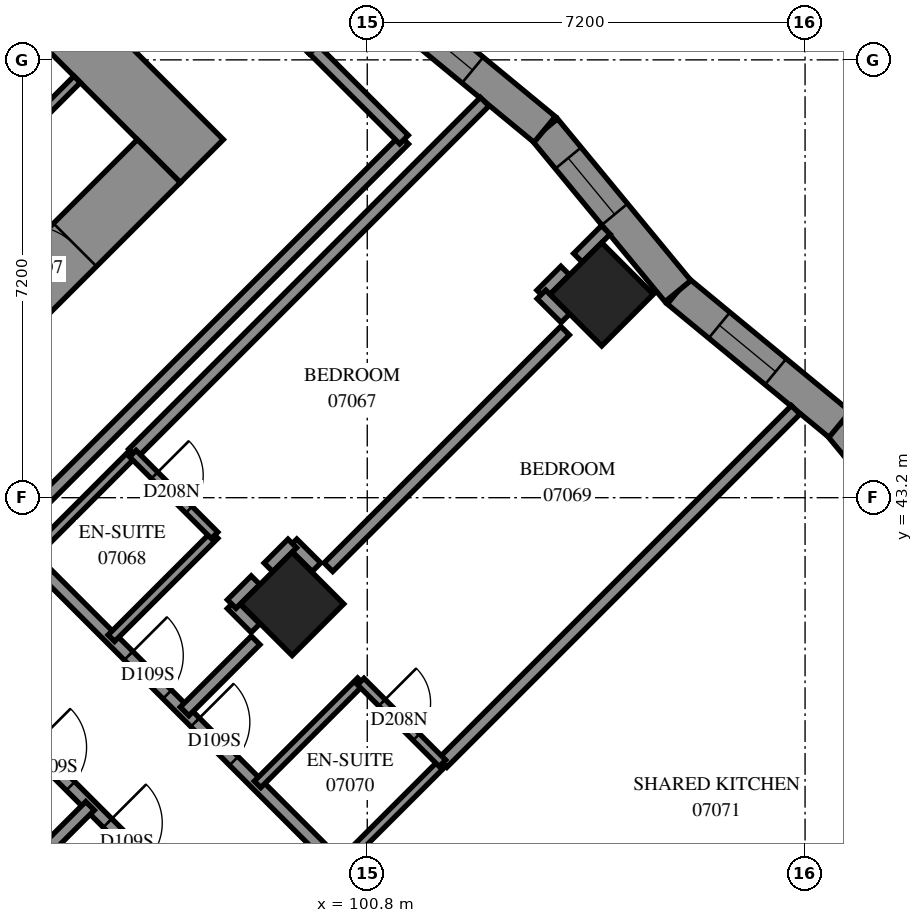
"""IFC4 building model, lengths in metres.
Left out: names, types, materials, properties, quantities, classifications, styles, units other than length and angle.
Written with IfcOpenShell. Run it as: python <this file> out.ifc"""

import sys

from ifc_helpers import new_model, si_unit, direction, frame, frame_2d, origin, origin_2d, place, context, subcontext, project, spatial, polyline, rectangle, outline, extrude, element, fill, save


model = new_model("IFC4")
c1 = context("Model", 3, precision=1e-05, world=origin(), true_north=direction((0.0, 1.0)))
c2 = subcontext(c1, "Body", "Model", "MODEL_VIEW")
j1 = project(units=[si_unit("LENGTHUNIT", "METRE"), si_unit("PLANEANGLEUNIT", "RADIAN")], contexts=[c1])
p1 = place(None, origin())
s1 = spatial("IfcSite", under=j1, at=p1, CompositionType="ELEMENT")
p2 = place(p1, origin())
s2 = spatial("IfcBuilding", under=s1, at=p2, CompositionType="ELEMENT")
p3 = place(p2, frame((0.0, 0.0, 30.4)))
s3 = spatial("IfcBuildingStorey", under=s2, at=p3, CompositionType="ELEMENT", Elevation=30.4)
for number, where, z_axis, x_axis in (
    (1, (104.656, 46.544, 0.0), (0.0, 0.0, 1.0), (0.707, -0.707, 0.0)),
    (2, (99.565, 41.453, 0.0), (0.0, 0.0, 1.0), (0.707, -0.707, 0.0)),
):
    element("IfcColumn", number, at=place(p3, frame(where, z_axis=z_axis, x_axis=x_axis)), inside=s3, PredefinedType="COLUMN", context=c2, shape_type="SweptSolid", body=[
        extrude(rectangle(XDim=1.2, YDim=1.2, at=origin_2d()), origin(), (0.0, 0.0, 1.0), 3.1),
    ])
p4 = place(p3, frame((86.483, 60.333, -0.3), z_axis=(0.0, 0.0, 1.0), x_axis=(0.70710983, -0.7071037324, 0.0)))
e3 = element("IfcWall", 3, at=p4, inside=s3, PredefinedType="SHEAR", context=c2, shape_type="SweptSolid", body=[
    extrude(rectangle(XDim=16.4, YDim=1.0, at=frame_2d((8.2, 0.0))), origin(), (0.0, 0.0, 1.0), 2.7),
])
p5 = place(p4, frame((11.0, 0.0, 0.3)))
e4 = element("IfcOpeningElement", 4, at=p5, cuts=e3, PredefinedType="OPENING", context=c2, shape_type="SweptSolid", body=[
    extrude(rectangle(XDim=0.8, YDim=2.1, at=frame_2d((0.4, 1.05))), frame((0.0, 0.51, 0.0), z_axis=(0.0, -1.0, 0.0), x_axis=(1.0, 0.0, 0.0)), (0.0, 0.0, 1.0), 1.02),
])
p6 = place(p3, frame((87.19, 38.554, -0.3), z_axis=(0.0, 0.0, 1.0), x_axis=(0.707103309, 0.7071102534, 0.0)))
e5 = element("IfcWall", 5, at=p6, inside=s3, PredefinedType="SHEAR", context=c2, shape_type="SweptSolid", body=[
    extrude(rectangle(XDim=14.4, YDim=1.0, at=frame_2d((7.2, 0.0))), origin(), (0.0, 0.0, 1.0), 2.7),
])
p7 = place(p6, frame((4.55, 0.0, 0.3)))
e6 = element("IfcOpeningElement", 6, at=p7, cuts=e5, PredefinedType="OPENING", context=c2, shape_type="SweptSolid", body=[
    extrude(rectangle(XDim=1.1, YDim=2.1, at=frame_2d((0.55, 1.05))), frame((0.0, 0.51, 0.0), z_axis=(0.0, -1.0, 0.0), x_axis=(1.0, 0.0, 0.0)), (0.0, 0.0, 1.0), 1.02),
])
p8 = place(p6, frame((11.35, 0.0, 0.3)))
e7 = element("IfcOpeningElement", 7, at=p8, cuts=e5, PredefinedType="OPENING", context=c2, shape_type="SweptSolid", body=[
    extrude(rectangle(XDim=1.1, YDim=2.1, at=frame_2d((0.55, 1.05))), frame((0.0, 0.51, 0.0), z_axis=(0.0, -1.0, 0.0), x_axis=(1.0, 0.0, 0.0)), (0.0, 0.0, 1.0), 1.02),
])
p9 = place(p3, frame((110.76, 41.746, 0.0), z_axis=(0.0, 0.0, 1.0), x_axis=(-0.636139456, 0.7715741005, 0.0)))
e8 = element("IfcWall", 8, at=p9, inside=s3, PredefinedType="SOLIDWALL", context=c2, shape_type="SweptSolid", body=[
    extrude(outline(polyline([(0.026, -0.275), (3.472, -0.275), (3.42, 0.275), (-0.026, 0.275), (0.026, -0.275)])), origin(), (0.0, 0.0, 1.0), 3.1),
])
p10 = place(p9, frame((1.266, 0.0, 0.5)))
e9 = element("IfcOpeningElement", 9, at=p10, cuts=e8, PredefinedType="OPENING", context=c2, shape_type="SweptSolid", body=[
    extrude(rectangle(XDim=1.2, YDim=2.45, at=frame_2d((0.6, 1.225))), frame((0.0, 0.285, 0.0), z_axis=(0.0, -1.0, 0.0), x_axis=(1.0, 0.0, 0.0)), (0.0, 0.0, 1.0), 0.57),
])
p11 = place(p3, frame((108.568, 44.405, 0.0), z_axis=(0.0, 0.0, 1.0), x_axis=(-0.7715741005, 0.636139456, 0.0)))
e10 = element("IfcWall", 10, at=p11, inside=s3, PredefinedType="SOLIDWALL", context=c2, shape_type="SweptSolid", body=[
    extrude(outline(polyline([(-0.026, -0.275), (3.42, -0.275), (3.472, 0.275), (0.026, 0.275), (-0.026, -0.275)])), origin(), (0.0, 0.0, 1.0), 3.1),
])
p12 = place(p11, frame((1.364, 0.0, 0.5)))
e11 = element("IfcOpeningElement", 11, at=p12, cuts=e10, PredefinedType="OPENING", context=c2, shape_type="SweptSolid", body=[
    extrude(rectangle(XDim=1.2, YDim=2.45, at=frame_2d((0.6, 1.225))), frame((0.0, 0.285, 0.0), z_axis=(0.0, -1.0, 0.0), x_axis=(1.0, 0.0, 0.0)), (0.0, 0.0, 1.0), 0.57),
])
p13 = place(p3, frame((105.91, 46.597, 0.0), z_axis=(0.0, 0.0, 1.0), x_axis=(-0.6361567317, 0.7715598569, 0.0)))
e12 = element("IfcWall", 12, at=p13, inside=s3, PredefinedType="SOLIDWALL", context=c2, shape_type="SweptSolid", body=[
    extrude(outline(polyline([(0.026, -0.275), (3.472, -0.275), (3.42, 0.275), (-0.026, 0.275), (0.026, -0.275)])), origin(), (0.0, 0.0, 1.0), 3.1),
])
p14 = place(p13, frame((1.636, 0.0, 0.5)))
e13 = element("IfcOpeningElement", 13, at=p14, cuts=e12, PredefinedType="OPENING", context=c2, shape_type="SweptSolid", body=[
    extrude(rectangle(XDim=1.2, YDim=2.45, at=frame_2d((0.6, 1.225))), frame((0.0, 0.285, 0.0), z_axis=(0.0, -1.0, 0.0), x_axis=(1.0, 0.0, 0.0)), (0.0, 0.0, 1.0), 0.57),
])
p15 = place(p3, frame((103.717, 49.256, 0.0), z_axis=(0.0, 0.0, 1.0), x_axis=(-0.7715598569, 0.6361567317, 0.0)))
e14 = element("IfcWall", 14, at=p15, inside=s3, PredefinedType="SOLIDWALL", context=c2, shape_type="SweptSolid", body=[
    extrude(outline(polyline([(-0.026, -0.275), (3.42, -0.275), (3.472, 0.275), (0.026, 0.275), (-0.026, -0.275)])), origin(), (0.0, 0.0, 1.0), 3.1),
])
p16 = place(p15, frame((1.535, 0.0, 0.5)))
e15 = element("IfcOpeningElement", 15, at=p16, cuts=e14, PredefinedType="OPENING", context=c2, shape_type="SweptSolid", body=[
    extrude(rectangle(XDim=1.2, YDim=2.45, at=frame_2d((0.6, 1.225))), frame((0.0, 0.285, 0.0), z_axis=(0.0, -1.0, 0.0), x_axis=(1.0, 0.0, 0.0)), (0.0, 0.0, 1.0), 0.57),
])
p17 = place(p3, frame((95.308, 49.358, 0.0), z_axis=(0.0, 0.0, 1.0), x_axis=(0.70705776, 0.707155799, 0.0)))
e16 = element("IfcWall", 16, at=p17, inside=s3, PredefinedType="PARTITIONING", context=c2, shape_type="SweptSolid", body=[
    extrude(rectangle(XDim=1.02, YDim=0.15, at=frame_2d((0.51, 0.0))), origin(), (0.0, 0.0, 1.0), 3.1),
])
p18 = place(p3, frame((94.895, 42.581, 0.0), z_axis=(0.0, 0.0, 1.0), x_axis=(0.7071067812, -0.7071067812, 0.0)))
e17 = element("IfcWall", 17, at=p18, inside=s3, PredefinedType="PARTITIONING", context=c2, shape_type="SweptSolid", body=[
    extrude(rectangle(XDim=14.9, YDim=0.2, at=frame_2d((7.45, 0.0))), origin(), (0.0, 0.0, 1.0), 3.1),
])
p19 = place(p18, frame((2.8, 0.0, 0.0)))
e18 = element("IfcOpeningElement", 18, at=p19, cuts=e17, PredefinedType="OPENING", context=c2, shape_type="SweptSolid", body=[
    extrude(rectangle(XDim=0.9, YDim=2.1, at=frame_2d((0.45, 1.05))), frame((0.0, 0.11, 0.0), z_axis=(0.0, -1.0, 0.0), x_axis=(1.0, 0.0, 0.0)), (0.0, 0.0, 1.0), 0.22),
])
p20 = place(p18, frame((4.348, 0.0, 0.0)))
e19 = element("IfcOpeningElement", 19, at=p20, cuts=e17, PredefinedType="OPENING", context=c2, shape_type="SweptSolid", body=[
    extrude(rectangle(XDim=0.9, YDim=2.1, at=frame_2d((0.45, 1.05))), frame((0.0, 0.11, 0.0), z_axis=(0.0, -1.0, 0.0), x_axis=(1.0, 0.0, 0.0)), (0.0, 0.0, 1.0), 0.22),
])
p21 = place(p18, frame((10.073, 0.0, 0.0)))
e20 = element("IfcOpeningElement", 20, at=p21, cuts=e17, PredefinedType="OPENING", context=c2, shape_type="SweptSolid", body=[
    extrude(rectangle(XDim=1.0, YDim=2.1, at=frame_2d((0.5, 1.05))), frame((0.0, 0.11, 0.0), z_axis=(0.0, -1.0, 0.0), x_axis=(1.0, 0.0, 0.0)), (0.0, 0.0, 1.0), 0.22),
])
p22 = place(p3, frame((105.437, 32.045, 0.0), z_axis=(0.0, 0.0, 1.0), x_axis=(0.7070175341, 0.707196017, 0.0)))
e21 = element("IfcWall", 21, at=p22, inside=s3, PredefinedType="PARTITIONING", context=c2, shape_type="SweptSolid", body=[
    extrude(rectangle(XDim=10.645, YDim=0.2, at=frame_2d((5.323, 0.0))), origin(), (0.0, 0.0, 1.0), 3.1),
])
p23 = place(p3, frame((94.901, 42.583, 0.0), z_axis=(0.0, 0.0, 1.0), x_axis=(0.7072154749, 0.7069980708, 0.0)))
e22 = element("IfcWall", 22, at=p23, inside=s3, PredefinedType="PARTITIONING", context=c2, shape_type="SweptSolid", body=[
    extrude(rectangle(XDim=9.2, YDim=0.2, at=frame_2d((4.6, 0.0))), origin(), (0.0, 0.0, 1.0), 3.1),
])
p24 = place(p3, frame((102.039, 38.837, 0.0), z_axis=(0.0, 0.0, 1.0), x_axis=(0.7071067812, 0.7071067812, 0.0)))
e23 = element("IfcWall", 23, at=p24, inside=s3, PredefinedType="PARTITIONING", context=c2, shape_type="SweptSolid", body=[
    extrude(rectangle(XDim=8.212, YDim=0.2, at=frame_2d((4.106, 0.0))), origin(), (0.0, 0.0, 1.0), 3.1),
])
p25 = place(p3, frame((96.947, 43.929, 0.0), z_axis=(0.0, 0.0, 1.0), x_axis=(0.707112894, 0.7071006683, 0.0)))
e24 = element("IfcWall", 24, at=p25, inside=s3, PredefinedType="PARTITIONING", context=c2, shape_type="SweptSolid", body=[
    extrude(rectangle(XDim=8.18, YDim=0.2, at=frame_2d((4.09, 0.0))), origin(), (0.0, 0.0, 1.0), 3.1),
])
p26 = place(p3, frame((100.161, 42.057, 0.0), z_axis=(0.0, 0.0, 1.0), x_axis=(0.7072884866, 0.706925029, 0.0)))
e25 = element("IfcWall", 25, at=p26, inside=s3, PredefinedType="PARTITIONING", context=c2, shape_type="SweptSolid", body=[
    extrude(rectangle(XDim=5.503, YDim=0.2, at=frame_2d((2.751, 0.0))), origin(), (0.0, 0.0, 1.0), 3.1),
])
p27 = place(p3, frame((93.699, 40.679, 0.0), z_axis=(0.0, 0.0, 1.0), x_axis=(0.7071067812, -0.7071067812, 0.0)))
e26 = element("IfcWall", 26, at=p27, inside=s3, PredefinedType="PARTITIONING", context=c2, shape_type="SweptSolid", body=[
    extrude(rectangle(XDim=5.301, YDim=0.2, at=frame_2d((2.65, 0.0))), origin(), (0.0, 0.0, 1.0), 3.1),
])
p28 = place(p27, frame((2.242, 0.0, 0.0)))
e27 = element("IfcOpeningElement", 27, at=p28, cuts=e26, PredefinedType="OPENING", context=c2, shape_type="SweptSolid", body=[
    extrude(rectangle(XDim=0.9, YDim=2.1, at=frame_2d((0.45, 1.05))), frame((0.0, 0.11, 0.0), z_axis=(0.0, -1.0, 0.0), x_axis=(1.0, 0.0, 0.0)), (0.0, 0.0, 1.0), 0.22),
])
p29 = place(p27, frame((4.002, 0.0, 0.0)))
e28 = element("IfcOpeningElement", 28, at=p29, cuts=e26, PredefinedType="OPENING", context=c2, shape_type="SweptSolid", body=[
    extrude(rectangle(XDim=0.9, YDim=2.1, at=frame_2d((0.45, 1.05))), frame((0.0, 0.11, 0.0), z_axis=(0.0, -1.0, 0.0), x_axis=(1.0, 0.0, 0.0)), (0.0, 0.0, 1.0), 0.22),
])
for number, where, z_axis, x_axis in (
    (29, (100.34, 37.142, 0.0), (0.0, 0.0, 1.0), (0.708, 0.707, 0.0)),
    (30, (96.592, 40.89, 0.0), (0.0, 0.0, 1.0), (0.708, 0.707, 0.0)),
    (31, (98.996, 38.486, 0.0), (0.0, 0.0, 1.0), (0.708, 0.707, 0.0)),
    (32, (95.252, 42.23, 0.0), (0.0, 0.0, 1.0), (0.707, 0.708, 0.0)),
):
    element("IfcWall", number, at=place(p3, frame(where, z_axis=z_axis, x_axis=x_axis)), inside=s3, PredefinedType="PARTITIONING", context=c2, shape_type="SweptSolid", body=[
        extrude(rectangle(XDim=2.4, YDim=0.15, at=frame_2d((1.2, 0.0))), origin(), (0.0, 0.0, 1.0), 3.1),
    ])
p30 = place(p3, frame((99.918, 50.574, 0.0), z_axis=(0.0, 0.0, 1.0), x_axis=(0.7075827869, -0.7066304548, 0.0)))
e33 = element("IfcWall", 33, at=p30, inside=s3, PredefinedType="PARTITIONING", context=c2, shape_type="SweptSolid", body=[
    extrude(rectangle(XDim=2.1, YDim=0.2, at=frame_2d((1.05, 0.0))), origin(), (0.0, 0.0, 1.0), 3.1),
])
p31 = place(p3, frame((96.945, 43.925, 0.0), z_axis=(0.0, 0.0, 1.0), x_axis=(0.7071067812, -0.7071067812, 0.0)))
e34 = element("IfcWall", 34, at=p31, inside=s3, PredefinedType="PARTITIONING", context=c2, shape_type="SweptSolid", body=[
    extrude(rectangle(XDim=1.901, YDim=0.15, at=frame_2d((0.95, 0.0))), origin(), (0.0, 0.0, 1.0), 3.1),
])
p32 = place(p31, frame((0.505, 0.0, 0.0)))
e35 = element("IfcOpeningElement", 35, at=p32, cuts=e34, PredefinedType="OPENING", context=c2, shape_type="SweptSolid", body=[
    extrude(rectangle(XDim=0.8, YDim=2.1, at=frame_2d((0.4, 1.05))), frame((0.0, 0.085, 0.0), z_axis=(0.0, -1.0, 0.0), x_axis=(1.0, 0.0, 0.0)), (0.0, 0.0, 1.0), 0.17),
])
p33 = place(p3, frame((100.693, 40.177, 0.0), z_axis=(0.0, 0.0, 1.0), x_axis=(0.7071067812, -0.7071067812, 0.0)))
e36 = element("IfcWall", 36, at=p33, inside=s3, PredefinedType="PARTITIONING", context=c2, shape_type="SweptSolid", body=[
    extrude(rectangle(XDim=1.901, YDim=0.15, at=frame_2d((0.95, 0.0))), origin(), (0.0, 0.0, 1.0), 3.1),
])
p34 = place(p33, frame((0.493, 0.0, 0.0)))
e37 = element("IfcOpeningElement", 37, at=p34, cuts=e36, PredefinedType="OPENING", context=c2, shape_type="SweptSolid", body=[
    extrude(rectangle(XDim=0.8, YDim=2.1, at=frame_2d((0.4, 1.05))), frame((0.0, 0.085, 0.0), z_axis=(0.0, -1.0, 0.0), x_axis=(1.0, 0.0, 0.0)), (0.0, 0.0, 1.0), 0.17),
])
for number, where, z_axis, x_axis in (
    (38, (97.796, 39.686, 0.0), (0.0, 0.0, 1.0), (0.707, 0.707, 0.0)),
    (39, (95.073, 36.963, 0.0), (0.0, 0.0, 1.0), (0.707, 0.707, 0.0)),
):
    element("IfcWall", number, at=place(p3, frame(where, z_axis=z_axis, x_axis=x_axis)), inside=s3, PredefinedType="PARTITIONING", context=c2, shape_type="SweptSolid", body=[
        extrude(rectangle(XDim=1.652, YDim=0.2, at=frame_2d((0.826, 0.0))), origin(), (0.0, 0.0, 1.0), 3.1),
    ])
p35 = place(p3, frame((99.453, 51.033, 0.0), z_axis=(0.0, 0.0, 1.0), x_axis=(0.7071067812, -0.7071067812, 0.0)))
e40 = element("IfcWall", 40, at=p35, inside=s3, PredefinedType="PARTITIONING", context=c2, shape_type="SweptSolid", body=[
    extrude(rectangle(XDim=0.653, YDim=0.2, at=frame_2d((0.327, 0.0))), origin(), (0.0, 0.0, 1.0), 3.1),
])
p36 = place(p3, frame((104.265, 47.145, 0.0), z_axis=(0.0, 0.0, 1.0), x_axis=(0.7071839131, 0.7070296409, 0.0)))
e41 = element("IfcWall", 41, at=p36, inside=s3, PredefinedType="PARTITIONING", context=c2, shape_type="SweptSolid", body=[
    extrude(rectangle(XDim=0.648, YDim=0.2, at=frame_2d((0.324, 0.0))), origin(), (0.0, 0.0, 1.0), 3.1),
])
p37 = place(p3, frame((103.661, 46.541, 0.0), z_axis=(0.0, 0.0, 1.0), x_axis=(0.7071067812, 0.7071067812, 0.0)))
e42 = element("IfcWall", 42, at=p37, inside=s3, PredefinedType="PARTITIONING", context=c2, shape_type="SweptSolid", body=[
    extrude(rectangle(XDim=0.557, YDim=0.2, at=frame_2d((0.279, 0.0))), origin(), (0.0, 0.0, 1.0), 3.1),
])
for number, where, z_axis, x_axis in (
    (43, (98.57, 41.448, 0.0), (0.0, 0.0, 1.0), (0.705, -0.709, 0.0)),
    (44, (99.571, 42.449, 0.0), (0.0, 0.0, 1.0), (0.709, -0.705, 0.0)),
    (45, (103.665, 46.543, 0.0), (0.0, 0.0, 1.0), (0.709, -0.705, 0.0)),
):
    element("IfcWall", number, at=place(p3, frame(where, z_axis=z_axis, x_axis=x_axis)), inside=s3, PredefinedType="PARTITIONING", context=c2, shape_type="SweptSolid", body=[
        extrude(rectangle(XDim=0.556, YDim=0.2, at=frame_2d((0.278, 0.0))), origin(), (0.0, 0.0, 1.0), 3.1),
    ])
for number, where, z_axis, x_axis in (
    (46, (98.571, 41.451, 0.0), (0.0, 0.0, 1.0), (0.707, 0.707, 0.0)),
    (47, (99.175, 42.055, 0.0), (0.0, 0.0, 1.0), (0.707, 0.707, 0.0)),
):
    element("IfcWall", number, at=place(p3, frame(where, z_axis=z_axis, x_axis=x_axis)), inside=s3, PredefinedType="PARTITIONING", context=c2, shape_type="SweptSolid", body=[
        extrude(rectangle(XDim=0.554, YDim=0.2, at=frame_2d((0.277, 0.0))), origin(), (0.0, 0.0, 1.0), 3.1),
    ])
p38 = place(p12, origin())
e48 = element("IfcWindow", 48, at=p38, inside=s3, PartitioningType="SINGLE_PANEL", PredefinedType="WINDOW", context=c2, shape_type="SweptSolid", body=[
    extrude(rectangle(XDim=1.2, YDim=2.45, at=frame_2d((0.6, 1.225))), frame((0.0, 0.155, 0.0), z_axis=(0.0, -1.0, 0.0), x_axis=(1.0, 0.0, 0.0)), (0.0, 0.0, 1.0), 0.06),
])
fill(e11, e48)
p39 = place(p14, origin())
e49 = element("IfcWindow", 49, at=p39, inside=s3, PartitioningType="SINGLE_PANEL", PredefinedType="WINDOW", context=c2, shape_type="SweptSolid", body=[
    extrude(rectangle(XDim=1.2, YDim=2.45, at=frame_2d((0.6, 1.225))), frame((0.0, 0.155, 0.0), z_axis=(0.0, -1.0, 0.0), x_axis=(1.0, 0.0, 0.0)), (0.0, 0.0, 1.0), 0.06),
])
fill(e13, e49)
p40 = place(p16, origin())
e50 = element("IfcWindow", 50, at=p40, inside=s3, PartitioningType="SINGLE_PANEL", PredefinedType="WINDOW", context=c2, shape_type="SweptSolid", body=[
    extrude(rectangle(XDim=1.2, YDim=2.45, at=frame_2d((0.6, 1.225))), frame((0.0, 0.155, 0.0), z_axis=(0.0, -1.0, 0.0), x_axis=(1.0, 0.0, 0.0)), (0.0, 0.0, 1.0), 0.06),
])
fill(e15, e50)
p41 = place(p8, origin())
e51 = element("IfcDoor", 51, at=p41, inside=s3, OperationType="SINGLE_SWING_RIGHT", PredefinedType="DOOR", context=c2, shape_type="SweptSolid", body=[
    extrude(rectangle(XDim=1.1, YDim=2.1, at=frame_2d((0.55, 1.05))), frame((0.0, 0.025, 0.0), z_axis=(0.0, -1.0, 0.0), x_axis=(1.0, 0.0, 0.0)), (0.0, 0.0, 1.0), 0.05),
])
fill(e7, e51)
p42 = place(p19, origin())
e52 = element("IfcDoor", 52, at=p42, inside=s3, OperationType="SINGLE_SWING_RIGHT", PredefinedType="DOOR", context=c2, shape_type="SweptSolid", body=[
    extrude(rectangle(XDim=0.9, YDim=2.1, at=frame_2d((0.45, 1.05))), frame((0.0, 0.025, 0.0), z_axis=(0.0, -1.0, 0.0), x_axis=(1.0, 0.0, 0.0)), (0.0, 0.0, 1.0), 0.05),
])
fill(e18, e52)
p43 = place(p32, origin())
e53 = element("IfcDoor", 53, at=p43, inside=s3, OperationType="SINGLE_SWING_RIGHT", PredefinedType="DOOR", context=c2, shape_type="SweptSolid", body=[
    extrude(rectangle(XDim=0.8, YDim=2.1, at=frame_2d((0.4, 1.05))), frame((0.0, 0.025, 0.0), z_axis=(0.0, -1.0, 0.0), x_axis=(1.0, 0.0, 0.0)), (0.0, 0.0, 1.0), 0.05),
])
fill(e35, e53)
p44 = place(p20, origin())
e54 = element("IfcDoor", 54, at=p44, inside=s3, OperationType="SINGLE_SWING_LEFT", PredefinedType="DOOR", context=c2, shape_type="SweptSolid", body=[
    extrude(rectangle(XDim=0.9, YDim=2.1, at=frame_2d((0.45, 1.05))), frame((0.0, 0.025, 0.0), z_axis=(0.0, -1.0, 0.0), x_axis=(1.0, 0.0, 0.0)), (0.0, 0.0, 1.0), 0.05),
])
fill(e19, e54)
p45 = place(p34, origin())
e55 = element("IfcDoor", 55, at=p45, inside=s3, OperationType="SINGLE_SWING_RIGHT", PredefinedType="DOOR", context=c2, shape_type="SweptSolid", body=[
    extrude(rectangle(XDim=0.8, YDim=2.1, at=frame_2d((0.4, 1.05))), frame((0.0, 0.025, 0.0), z_axis=(0.0, -1.0, 0.0), x_axis=(1.0, 0.0, 0.0)), (0.0, 0.0, 1.0), 0.05),
])
fill(e37, e55)
p46 = place(p28, origin())
e56 = element("IfcDoor", 56, at=p46, inside=s3, OperationType="SINGLE_SWING_LEFT", PredefinedType="DOOR", context=c2, shape_type="SweptSolid", body=[
    extrude(rectangle(XDim=0.9, YDim=2.1, at=frame_2d((0.45, 1.05))), frame((0.0, 0.025, 0.0), z_axis=(0.0, -1.0, 0.0), x_axis=(1.0, 0.0, 0.0)), (0.0, 0.0, 1.0), 0.05),
])
fill(e27, e56)
p47 = place(p29, origin())
e57 = element("IfcDoor", 57, at=p47, inside=s3, OperationType="SINGLE_SWING_RIGHT", PredefinedType="DOOR", context=c2, shape_type="SweptSolid", body=[
    extrude(rectangle(XDim=0.9, YDim=2.1, at=frame_2d((0.45, 1.05))), frame((0.0, 0.025, 0.0), z_axis=(0.0, -1.0, 0.0), x_axis=(1.0, 0.0, 0.0)), (0.0, 0.0, 1.0), 0.05),
])
fill(e28, e57)
save(model, sys.argv[1])
